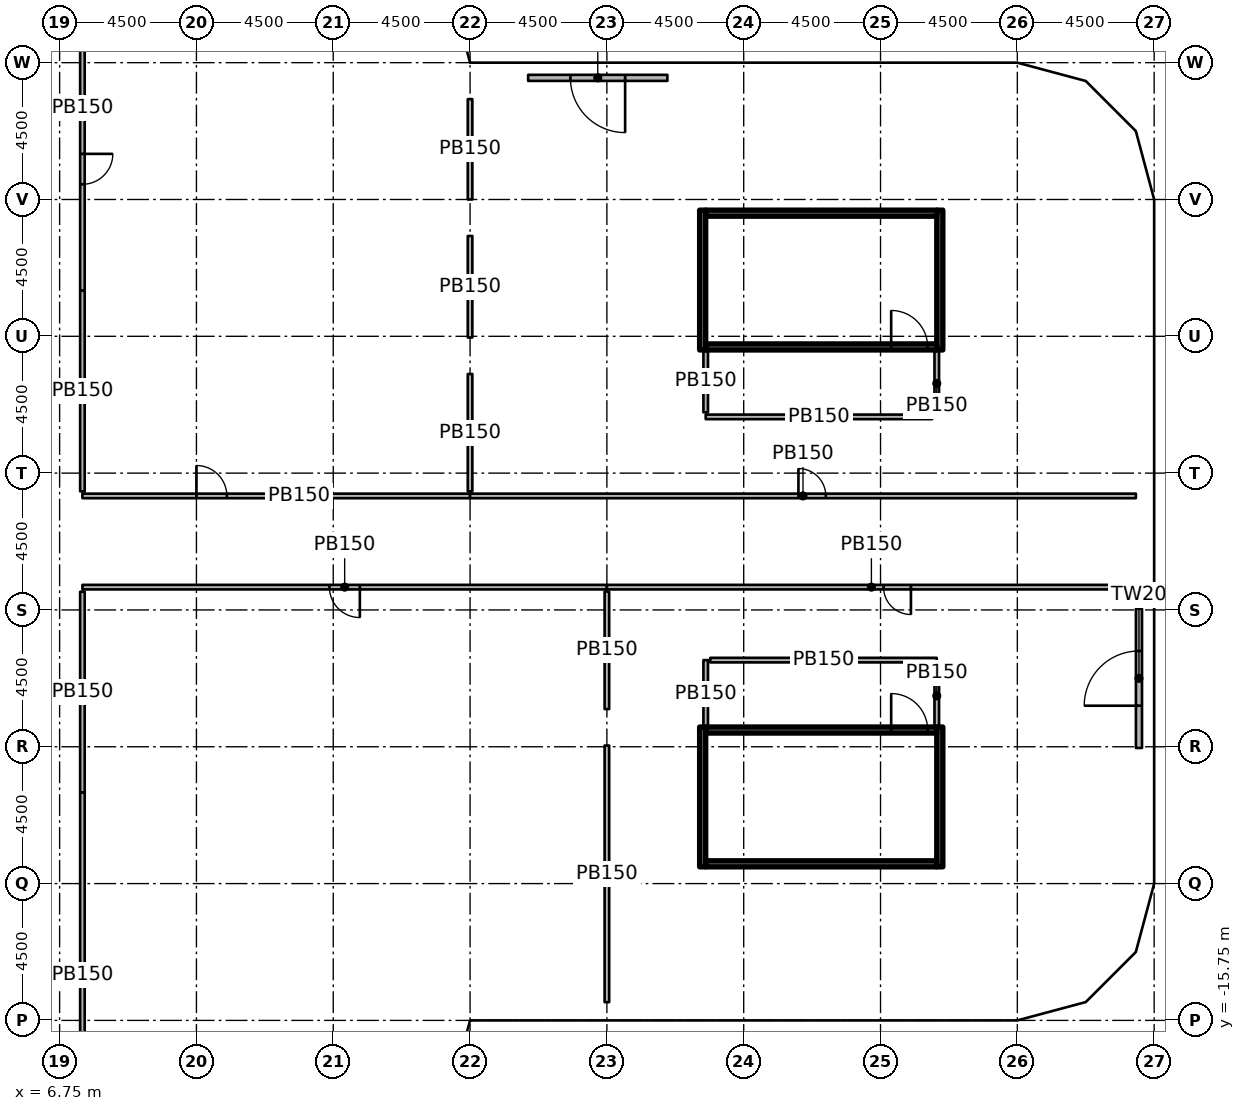
"""IFC4 building model, lengths in metres.
Left out: names, types, materials, properties, quantities, classifications, styles, units other than length and angle.
Written with IfcOpenShell. Run it as: python <this file> out.ifc"""

import sys

from ifc_helpers import new_model, si_unit, direction, frame, frame_2d, origin, origin_2d, place, context, subcontext, project, spatial, rectangle, extrude, element, fill, save


model = new_model("IFC4")
c1 = context("Model", 3, precision=1e-05, world=origin(), true_north=direction((0.0, 1.0)))
c2 = subcontext(c1, "Body", "Model", "MODEL_VIEW")
j1 = project(units=[si_unit("LENGTHUNIT", "METRE"), si_unit("PLANEANGLEUNIT", "RADIAN")], contexts=[c1])
p1 = place(None, origin())
s1 = spatial("IfcSite", under=j1, at=p1, CompositionType="ELEMENT")
p2 = place(p1, origin())
s2 = spatial("IfcBuilding", under=s1, at=p2, CompositionType="ELEMENT")
p3 = place(p2, frame((0.0, 0.0, 17.0)))
s3 = spatial("IfcBuildingStorey", under=s2, at=p3, CompositionType="ELEMENT", Elevation=17.0)
for number, where, z_axis, x_axis in (
    (1, (6.25, -15.75, 0.0), (0.0, 0.0, 1.0), (1.0, 0.0, 0.0)),
    (2, (6.25, -10.75, 0.0), (0.0, 0.0, 1.0), (1.0, 0.0, 0.0)),
    (3, (6.25, -6.25, 0.0), (0.0, 0.0, 1.0), (1.0, 0.0, 0.0)),
    (4, (6.25, 6.25, 0.0), (0.0, 0.0, 1.0), (1.0, 0.0, 0.0)),
    (5, (6.25, 10.75, 0.0), (0.0, 0.0, 1.0), (1.0, 0.0, 0.0)),
    (6, (6.25, 15.75, 0.0), (0.0, 0.0, 1.0), (1.0, 0.0, 0.0)),
    (7, (10.65, -15.15, 0.0), (0.0, 0.0, 1.0), (1.0, 0.0, 0.0)),
    (8, (10.75, -6.25, 0.0), (0.0, 0.0, 1.0), (1.0, 0.0, 0.0)),
    (9, (10.75, 6.25, 0.0), (0.0, 0.0, 1.0), (1.0, 0.0, 0.0)),
    (10, (10.65, 15.15, 0.0), (0.0, 0.0, 1.0), (1.0, 0.0, 0.0)),
    (11, (15.15, -10.65, 0.0), (0.0, 0.0, 1.0), (1.0, 0.0, 0.0)),
    (12, (15.75, -6.25, 0.0), (0.0, 0.0, 1.0), (1.0, 0.0, 0.0)),
    (13, (15.75, 6.25, 0.0), (0.0, 0.0, 1.0), (1.0, 0.0, 0.0)),
    (14, (15.15, 10.65, 0.0), (0.0, 0.0, 1.0), (1.0, 0.0, 0.0)),
    (15, (19.65, -15.15, 0.0), (0.0, 0.0, 1.0), (1.0, 0.0, 0.0)),
    (16, (20.25, -6.11, 0.0), (0.0, 0.0, 1.0), (1.0, 0.0, 0.0)),
    (17, (20.25, 6.11, 0.0), (0.0, 0.0, 1.0), (1.0, 0.0, 0.0)),
    (18, (20.25, 10.65, 0.0), (0.0, 0.0, 1.0), (1.0, 0.0, 0.0)),
    (19, (19.65, 15.15, 0.0), (0.0, 0.0, 1.0), (1.0, 0.0, 0.0)),
    (20, (24.75, -6.11, 0.0), (0.0, 0.0, 1.0), (1.0, 0.0, 0.0)),
    (21, (24.75, 6.11, 0.0), (0.0, 0.0, 1.0), (1.0, 0.0, 0.0)),
    (22, (28.908, -5.475, 0.0), (0.0, 0.0, 1.0), (1.0, 0.0, 0.0)),
    (23, (28.67, -2.25, 0.0), (0.0, 0.0, 1.0), (1.0, 0.0, 0.0)),
    (24, (28.67, 2.25, 0.0), (0.0, 0.0, 1.0), (1.0, 0.0, 0.0)),
    (25, (28.908, 5.475, 0.0), (0.0, 0.0, 1.0), (1.0, 0.0, 0.0)),
    (26, (29.25, 15.15, 0.0), (0.0, 0.0, 1.0), (1.0, 0.0, 0.0)),
    (27, (33.75, -15.15, 0.0), (0.0, 0.0, 1.0), (1.0, 0.0, 0.0)),
    (28, (33.11, -2.25, 0.0), (0.0, 0.0, 1.0), (1.0, 0.0, 0.0)),
    (29, (33.11, 2.25, 0.0), (0.0, 0.0, 1.0), (1.0, 0.0, 0.0)),
    (30, (37.47, 6.75, 0.0), (0.0, 0.0, 1.0), (1.0, 0.0, 0.0)),
    (31, (41.97, -11.25, 0.0), (0.0, 0.0, 1.0), (1.0, 0.0, 0.0)),
    (32, (42.15, 2.25, 0.0), (0.0, 0.0, 1.0), (1.0, 0.0, 0.0)),
):
    element("IfcColumn", number, at=place(p3, frame(where, z_axis=z_axis, x_axis=x_axis)), inside=s3, PredefinedType="COLUMN", context=c2, shape_type="SweptSolid", body=[
        extrude(rectangle(XDim=1.2, YDim=1.2, at=origin_2d()), origin(), (0.0, 0.0, 1.0), 4.55),
    ])
p4 = place(p3, frame((42.25, -6.79, 0.0), z_axis=(0.0, 0.0, 1.0), x_axis=(0.0, 1.0, 0.0)))
e33 = element("IfcWall", 33, at=p4, inside=s3, PredefinedType="SOLIDWALL", context=c2, shape_type="SweptSolid", body=[
    extrude(rectangle(XDim=4.58, YDim=0.2, at=frame_2d((2.29, 0.0))), origin(), (0.0, 0.0, 1.0), 4.55),
])
p5 = place(p4, frame((1.39, 0.0, 0.0)))
e34 = element("IfcOpeningElement", 34, at=p5, cuts=e33, PredefinedType="OPENING", context=c2, shape_type="SweptSolid", body=[
    extrude(rectangle(XDim=1.8, YDim=2.4, at=frame_2d((0.9, 1.2))), frame((0.0, 0.11, 0.0), z_axis=(0.0, -1.0, 0.0), x_axis=(1.0, 0.0, 0.0)), (0.0, 0.0, 1.0), 0.22),
])
p6 = place(p3, frame((26.74, 15.25, 0.0), z_axis=(0.0, 0.0, 1.0), x_axis=(-1.0, 0.0, 0.0)))
e35 = element("IfcWall", 35, at=p6, inside=s3, PredefinedType="SOLIDWALL", context=c2, shape_type="SweptSolid", body=[
    extrude(rectangle(XDim=4.58, YDim=0.2, at=frame_2d((2.29, 0.0))), origin(), (0.0, 0.0, 1.0), 4.55),
])
p7 = place(p6, frame((1.39, 0.0, 0.0)))
e36 = element("IfcOpeningElement", 36, at=p7, cuts=e35, PredefinedType="OPENING", context=c2, shape_type="SweptSolid", body=[
    extrude(rectangle(XDim=1.8, YDim=2.4, at=frame_2d((0.9, 1.2))), frame((0.0, 0.11, 0.0), z_axis=(0.0, -1.0, 0.0), x_axis=(1.0, 0.0, 0.0)), (0.0, 0.0, 1.0), 0.22),
])
for number, where, z_axis, x_axis in (
    (37, (27.9, 6.3, 0.0), (0.0, 0.0, 1.0), (0.0, 1.0, 0.0)),
    (38, (35.7, 6.3, 0.0), (0.0, 0.0, 1.0), (0.0, 1.0, 0.0)),
):
    element("IfcWall", number, at=place(p3, frame(where, z_axis=z_axis, x_axis=x_axis)), inside=s3, PredefinedType="SHEAR", context=c2, shape_type="SweptSolid", body=[
        extrude(rectangle(XDim=4.6, YDim=0.2, at=frame_2d((2.3, 0.0))), origin(), (0.0, 0.0, 1.0), 4.55),
    ])
p8 = place(p3, frame((28.0, 6.4, 0.0), z_axis=(0.0, 0.0, 1.0), x_axis=(1.0, 0.0, 0.0)))
e39 = element("IfcWall", 39, at=p8, inside=s3, PredefinedType="SHEAR", context=c2, shape_type="SweptSolid", body=[
    extrude(rectangle(XDim=7.6, YDim=0.2, at=frame_2d((3.8, 0.0))), origin(), (0.0, 0.0, 1.0), 4.55),
])
p9 = place(p8, frame((6.1, 0.0, 0.0)))
e40 = element("IfcOpeningElement", 40, at=p9, cuts=e39, PredefinedType="OPENING", context=c2, shape_type="SweptSolid", body=[
    extrude(rectangle(XDim=1.2, YDim=2.1, at=frame_2d((0.6, 1.05))), frame((0.0, 0.11, 0.0), z_axis=(0.0, -1.0, 0.0), x_axis=(1.0, 0.0, 0.0)), (0.0, 0.0, 1.0), 0.22),
])
p10 = place(p3, frame((28.0, 10.8, 0.0), z_axis=(0.0, 0.0, 1.0), x_axis=(1.0, 0.0, 0.0)))
e41 = element("IfcWall", 41, at=p10, inside=s3, PredefinedType="SHEAR", context=c2, shape_type="SweptSolid", body=[
    extrude(rectangle(XDim=7.6, YDim=0.2, at=frame_2d((3.8, 0.0))), origin(), (0.0, 0.0, 1.0), 4.55),
])
for number, where, z_axis, x_axis in (
    (42, (27.9, -10.7, 0.0), (0.0, 0.0, 1.0), (0.0, 1.0, 0.0)),
    (43, (35.7, -10.7, 0.0), (0.0, 0.0, 1.0), (0.0, 1.0, 0.0)),
):
    element("IfcWall", number, at=place(p3, frame(where, z_axis=z_axis, x_axis=x_axis)), inside=s3, PredefinedType="SHEAR", context=c2, shape_type="SweptSolid", body=[
        extrude(rectangle(XDim=4.6, YDim=0.2, at=frame_2d((2.3, 0.0))), origin(), (0.0, 0.0, 1.0), 4.55),
    ])
p11 = place(p3, frame((28.0, -10.6, 0.0), z_axis=(0.0, 0.0, 1.0), x_axis=(1.0, 0.0, 0.0)))
e44 = element("IfcWall", 44, at=p11, inside=s3, PredefinedType="SHEAR", context=c2, shape_type="SweptSolid", body=[
    extrude(rectangle(XDim=7.6, YDim=0.2, at=frame_2d((3.8, 0.0))), origin(), (0.0, 0.0, 1.0), 4.55),
])
p12 = place(p3, frame((28.0, -6.2, 0.0), z_axis=(0.0, 0.0, 1.0), x_axis=(1.0, 0.0, 0.0)))
e45 = element("IfcWall", 45, at=p12, inside=s3, PredefinedType="SHEAR", context=c2, shape_type="SweptSolid", body=[
    extrude(rectangle(XDim=7.6, YDim=0.2, at=frame_2d((3.8, 0.0))), origin(), (0.0, 0.0, 1.0), 4.55),
])
p13 = place(p12, frame((6.1, 0.0, 0.0)))
e46 = element("IfcOpeningElement", 46, at=p13, cuts=e45, PredefinedType="OPENING", context=c2, shape_type="SweptSolid", body=[
    extrude(rectangle(XDim=1.2, YDim=2.1, at=frame_2d((0.6, 1.05))), frame((0.0, 0.11, 0.0), z_axis=(0.0, -1.0, 0.0), x_axis=(1.0, 0.0, 0.0)), (0.0, 0.0, 1.0), 0.22),
])
p14 = place(p3, frame((35.6, 6.3, 0.0), z_axis=(0.0, 0.0, 1.0), x_axis=(0.0, -1.0, 0.0)))
e47 = element("IfcWall", 47, at=p14, inside=s3, PredefinedType="PARTITIONING", context=c2, shape_type="SweptSolid", body=[
    extrude(rectangle(XDim=2.2, YDim=0.15, at=frame_2d((1.1, 0.0))), origin(), (0.0, 0.0, 1.0), 4.55),
])
p15 = place(p3, frame((35.45, 4.1, 0.0), z_axis=(0.0, 0.0, 1.0), x_axis=(-1.0, 0.0, 0.0)))
e48 = element("IfcWall", 48, at=p15, inside=s3, PredefinedType="PARTITIONING", context=c2, shape_type="SweptSolid", body=[
    extrude(rectangle(XDim=7.45, YDim=0.15, at=frame_2d((3.725, 0.0))), origin(), (0.0, 0.0, 1.0), 4.55),
])
p16 = place(p3, frame((28.0, 4.25, 0.0), z_axis=(0.0, 0.0, 1.0), x_axis=(0.0, 1.0, 0.0)))
e49 = element("IfcWall", 49, at=p16, inside=s3, PredefinedType="PARTITIONING", context=c2, shape_type="SweptSolid", body=[
    extrude(rectangle(XDim=2.05, YDim=0.15, at=frame_2d((1.025, 0.0))), origin(), (0.0, 0.0, 1.0), 4.55),
])
p17 = place(p3, frame((28.0, -6.1, 0.0), z_axis=(0.0, 0.0, 1.0), x_axis=(0.0, 1.0, 0.0)))
e50 = element("IfcWall", 50, at=p17, inside=s3, PredefinedType="PARTITIONING", context=c2, shape_type="SweptSolid", body=[
    extrude(rectangle(XDim=2.2, YDim=0.15, at=frame_2d((1.1, 0.0))), origin(), (0.0, 0.0, 1.0), 4.55),
])
p18 = place(p3, frame((28.15, -3.9, 0.0), z_axis=(0.0, 0.0, 1.0), x_axis=(1.0, 0.0, 0.0)))
e51 = element("IfcWall", 51, at=p18, inside=s3, PredefinedType="PARTITIONING", context=c2, shape_type="SweptSolid", body=[
    extrude(rectangle(XDim=7.45, YDim=0.15, at=frame_2d((3.725, 0.0))), origin(), (0.0, 0.0, 1.0), 4.55),
])
p19 = place(p3, frame((35.6, -4.05, 0.0), z_axis=(0.0, 0.0, 1.0), x_axis=(0.0, -1.0, 0.0)))
e52 = element("IfcWall", 52, at=p19, inside=s3, PredefinedType="PARTITIONING", context=c2, shape_type="SweptSolid", body=[
    extrude(rectangle(XDim=2.05, YDim=0.15, at=frame_2d((1.025, 0.0))), origin(), (0.0, 0.0, 1.0), 4.55),
])
p20 = place(p3, frame((7.5, 20.25, 0.0), z_axis=(0.0, 0.0, 1.0), x_axis=(0.0, -1.0, 0.0)))
e53 = element("IfcWall", 53, at=p20, inside=s3, PredefinedType="PARTITIONING", context=c2, shape_type="SweptSolid", body=[
    extrude(rectangle(XDim=12.0, YDim=0.15, at=frame_2d((6.0, 0.0))), origin(), (0.0, 0.0, 1.0), 4.55),
])
p21 = place(p20, frame((7.5, 0.0, 0.0)))
e54 = element("IfcOpeningElement", 54, at=p21, cuts=e53, PredefinedType="OPENING", context=c2, shape_type="SweptSolid", body=[
    extrude(rectangle(XDim=1.0, YDim=2.1, at=frame_2d((0.5, 1.05))), frame((0.0, 0.085, 0.0), z_axis=(0.0, -1.0, 0.0), x_axis=(1.0, 0.0, 0.0)), (0.0, 0.0, 1.0), 0.17),
])
p22 = place(p3, frame((7.5, -8.25, 0.0), z_axis=(0.0, 0.0, 1.0), x_axis=(0.0, -1.0, 0.0)))
e55 = element("IfcWall", 55, at=p22, inside=s3, PredefinedType="PARTITIONING", context=c2, shape_type="SweptSolid", body=[
    extrude(rectangle(XDim=12.0, YDim=0.15, at=frame_2d((6.0, 0.0))), origin(), (0.0, 0.0, 1.0), 4.55),
])
p23 = place(p3, frame((7.5, 1.5, 0.0), z_axis=(0.0, 0.0, 1.0), x_axis=(1.0, 0.0, 0.0)))
e56 = element("IfcWall", 56, at=p23, inside=s3, PredefinedType="PARTITIONING", context=c2, shape_type="SweptSolid", body=[
    extrude(rectangle(XDim=12.75, YDim=0.15, at=frame_2d((6.375, 0.0))), origin(), (0.0, 0.0, 1.0), 4.55),
])
p24 = place(p23, frame((3.75, 0.0, 0.0)))
e57 = element("IfcOpeningElement", 57, at=p24, cuts=e56, PredefinedType="OPENING", context=c2, shape_type="SweptSolid", body=[
    extrude(rectangle(XDim=1.0, YDim=2.1, at=frame_2d((0.5, 1.05))), frame((0.0, 0.085, 0.0), z_axis=(0.0, -1.0, 0.0), x_axis=(1.0, 0.0, 0.0)), (0.0, 0.0, 1.0), 0.17),
])
p25 = place(p3, frame((20.25, 1.5, 0.0), z_axis=(0.0, 0.0, 1.0), x_axis=(1.0, 0.0, 0.0)))
e58 = element("IfcWall", 58, at=p25, inside=s3, PredefinedType="PARTITIONING", context=c2, shape_type="SweptSolid", body=[
    extrude(rectangle(XDim=21.9, YDim=0.15, at=frame_2d((10.95, 0.0))), origin(), (0.0, 0.0, 1.0), 4.55),
])
p26 = place(p25, frame((10.8, 0.0, 0.0)))
e59 = element("IfcOpeningElement", 59, at=p26, cuts=e58, PredefinedType="OPENING", context=c2, shape_type="SweptSolid", body=[
    extrude(rectangle(XDim=0.9, YDim=2.1, at=frame_2d((0.45, 1.05))), frame((0.0, 0.085, 0.0), z_axis=(0.0, -1.0, 0.0), x_axis=(1.0, 0.0, 0.0)), (0.0, 0.0, 1.0), 0.17),
])
p27 = place(p3, frame((24.75, -1.5, 0.0), z_axis=(0.0, 0.0, 1.0), x_axis=(-1.0, 0.0, 0.0)))
e60 = element("IfcWall", 60, at=p27, inside=s3, PredefinedType="PARTITIONING", context=c2, shape_type="SweptSolid", body=[
    extrude(rectangle(XDim=17.25, YDim=0.15, at=frame_2d((8.625, 0.0))), origin(), (0.0, 0.0, 1.0), 4.55),
])
p28 = place(p27, frame((8.125, 0.0, 0.0)))
e61 = element("IfcOpeningElement", 61, at=p28, cuts=e60, PredefinedType="OPENING", context=c2, shape_type="SweptSolid", body=[
    extrude(rectangle(XDim=1.0, YDim=2.1, at=frame_2d((0.5, 1.05))), frame((0.0, 0.085, 0.0), z_axis=(0.0, -1.0, 0.0), x_axis=(1.0, 0.0, 0.0)), (0.0, 0.0, 1.0), 0.17),
])
p29 = place(p3, frame((42.15, -1.5, 0.0), z_axis=(0.0, 0.0, 1.0), x_axis=(-1.0, 0.0, 0.0)))
e62 = element("IfcWall", 62, at=p29, inside=s3, PredefinedType="PARTITIONING", context=c2, shape_type="SweptSolid", body=[
    extrude(rectangle(XDim=17.4, YDim=0.15, at=frame_2d((8.7, 0.0))), origin(), (0.0, 0.0, 1.0), 4.55),
])
p30 = place(p29, frame((7.4, 0.0, 0.0)))
e63 = element("IfcOpeningElement", 63, at=p30, cuts=e62, PredefinedType="OPENING", context=c2, shape_type="SweptSolid", body=[
    extrude(rectangle(XDim=0.9, YDim=2.1, at=frame_2d((0.45, 1.05))), frame((0.0, 0.085, 0.0), z_axis=(0.0, -1.0, 0.0), x_axis=(1.0, 0.0, 0.0)), (0.0, 0.0, 1.0), 0.17),
])
p31 = place(p3, frame((20.25, 14.55, 0.0), z_axis=(0.0, 0.0, 1.0), x_axis=(0.0, -1.0, 0.0)))
e64 = element("IfcWall", 64, at=p31, inside=s3, PredefinedType="PARTITIONING", context=c2, shape_type="SweptSolid", body=[
    extrude(rectangle(XDim=3.3, YDim=0.15, at=frame_2d((1.65, 0.0))), origin(), (0.0, 0.0, 1.0), 4.55),
])
p32 = place(p3, frame((20.25, 10.05, 0.0), z_axis=(0.0, 0.0, 1.0), x_axis=(0.0, -1.0, 0.0)))
e65 = element("IfcWall", 65, at=p32, inside=s3, PredefinedType="PARTITIONING", context=c2, shape_type="SweptSolid", body=[
    extrude(rectangle(XDim=3.34, YDim=0.15, at=frame_2d((1.67, 0.0))), origin(), (0.0, 0.0, 1.0), 4.55),
])
p33 = place(p3, frame((20.25, 5.51, 0.0), z_axis=(0.0, 0.0, 1.0), x_axis=(0.0, -1.0, 0.0)))
e66 = element("IfcWall", 66, at=p33, inside=s3, PredefinedType="PARTITIONING", context=c2, shape_type="SweptSolid", body=[
    extrude(rectangle(XDim=3.86, YDim=0.15, at=frame_2d((1.93, 0.0))), origin(), (0.0, 0.0, 1.0), 4.55),
])
p34 = place(p3, frame((7.5, 1.65, 0.0), z_axis=(0.0, 0.0, 1.0), x_axis=(0.0, 1.0, 0.0)))
e67 = element("IfcWall", 67, at=p34, inside=s3, PredefinedType="PARTITIONING", context=c2, shape_type="SweptSolid", body=[
    extrude(rectangle(XDim=6.6, YDim=0.15, at=frame_2d((3.3, 0.0))), origin(), (0.0, 0.0, 1.0), 4.55),
])
p35 = place(p3, frame((24.75, -1.65, 0.0), z_axis=(0.0, 0.0, 1.0), x_axis=(0.0, -1.0, 0.0)))
e68 = element("IfcWall", 68, at=p35, inside=s3, PredefinedType="PARTITIONING", context=c2, shape_type="SweptSolid", body=[
    extrude(rectangle(XDim=3.86, YDim=0.15, at=frame_2d((1.93, 0.0))), origin(), (0.0, 0.0, 1.0), 4.55),
])
p36 = place(p3, frame((24.75, -6.71, 0.0), z_axis=(0.0, 0.0, 1.0), x_axis=(0.0, -1.0, 0.0)))
e69 = element("IfcWall", 69, at=p36, inside=s3, PredefinedType="PARTITIONING", context=c2, shape_type="SweptSolid", body=[
    extrude(rectangle(XDim=8.44, YDim=0.15, at=frame_2d((4.22, 0.0))), origin(), (0.0, 0.0, 1.0), 4.55),
])
p37 = place(p3, frame((7.5, -8.25, 0.0), z_axis=(0.0, 0.0, 1.0), x_axis=(0.0, 1.0, 0.0)))
e70 = element("IfcWall", 70, at=p37, inside=s3, PredefinedType="PARTITIONING", context=c2, shape_type="SweptSolid", body=[
    extrude(rectangle(XDim=6.6, YDim=0.15, at=frame_2d((3.3, 0.0))), origin(), (0.0, 0.0, 1.0), 4.55),
])
p38 = place(p5, origin())
e71 = element("IfcDoor", 71, at=p38, inside=s3, OperationType="SINGLE_SWING_LEFT", PredefinedType="DOOR", context=c2, shape_type="SweptSolid", body=[
    extrude(rectangle(XDim=1.8, YDim=2.4, at=frame_2d((0.9, 1.2))), frame((0.0, 0.025, 0.0), z_axis=(0.0, -1.0, 0.0), x_axis=(1.0, 0.0, 0.0)), (0.0, 0.0, 1.0), 0.05),
])
fill(e34, e71)
p39 = place(p7, origin())
e72 = element("IfcDoor", 72, at=p39, inside=s3, OperationType="SINGLE_SWING_LEFT", PredefinedType="DOOR", context=c2, shape_type="SweptSolid", body=[
    extrude(rectangle(XDim=1.8, YDim=2.4, at=frame_2d((0.9, 1.2))), frame((0.0, 0.025, 0.0), z_axis=(0.0, -1.0, 0.0), x_axis=(1.0, 0.0, 0.0)), (0.0, 0.0, 1.0), 0.05),
])
fill(e36, e72)
p40 = place(p9, origin())
e73 = element("IfcDoor", 73, at=p40, inside=s3, OperationType="SINGLE_SWING_RIGHT", PredefinedType="DOOR", context=c2, shape_type="SweptSolid", body=[
    extrude(rectangle(XDim=1.2, YDim=2.1, at=frame_2d((0.6, 1.05))), frame((0.0, 0.025, 0.0), z_axis=(0.0, -1.0, 0.0), x_axis=(1.0, 0.0, 0.0)), (0.0, 0.0, 1.0), 0.05),
])
fill(e40, e73)
p41 = place(p13, origin())
e74 = element("IfcDoor", 74, at=p41, inside=s3, OperationType="SINGLE_SWING_RIGHT", PredefinedType="DOOR", context=c2, shape_type="SweptSolid", body=[
    extrude(rectangle(XDim=1.2, YDim=2.1, at=frame_2d((0.6, 1.05))), frame((0.0, 0.025, 0.0), z_axis=(0.0, -1.0, 0.0), x_axis=(1.0, 0.0, 0.0)), (0.0, 0.0, 1.0), 0.05),
])
fill(e46, e74)
p42 = place(p21, origin())
e75 = element("IfcDoor", 75, at=p42, inside=s3, OperationType="SINGLE_SWING_LEFT", PredefinedType="DOOR", context=c2, shape_type="SweptSolid", body=[
    extrude(rectangle(XDim=1.0, YDim=2.1, at=frame_2d((0.5, 1.05))), frame((0.0, 0.025, 0.0), z_axis=(0.0, -1.0, 0.0), x_axis=(1.0, 0.0, 0.0)), (0.0, 0.0, 1.0), 0.05),
])
fill(e54, e75)
p43 = place(p24, origin())
e76 = element("IfcDoor", 76, at=p43, inside=s3, OperationType="SINGLE_SWING_LEFT", PredefinedType="DOOR", context=c2, shape_type="SweptSolid", body=[
    extrude(rectangle(XDim=1.0, YDim=2.1, at=frame_2d((0.5, 1.05))), frame((0.0, 0.025, 0.0), z_axis=(0.0, -1.0, 0.0), x_axis=(1.0, 0.0, 0.0)), (0.0, 0.0, 1.0), 0.05),
])
fill(e57, e76)
p44 = place(p26, origin())
e77 = element("IfcDoor", 77, at=p44, inside=s3, OperationType="SINGLE_SWING_LEFT", PredefinedType="DOOR", context=c2, shape_type="SweptSolid", body=[
    extrude(rectangle(XDim=0.9, YDim=2.1, at=frame_2d((0.45, 1.05))), frame((0.0, 0.025, 0.0), z_axis=(0.0, -1.0, 0.0), x_axis=(1.0, 0.0, 0.0)), (0.0, 0.0, 1.0), 0.05),
])
fill(e59, e77)
p45 = place(p28, origin())
e78 = element("IfcDoor", 78, at=p45, inside=s3, OperationType="SINGLE_SWING_LEFT", PredefinedType="DOOR", context=c2, shape_type="SweptSolid", body=[
    extrude(rectangle(XDim=1.0, YDim=2.1, at=frame_2d((0.5, 1.05))), frame((0.0, 0.025, 0.0), z_axis=(0.0, -1.0, 0.0), x_axis=(1.0, 0.0, 0.0)), (0.0, 0.0, 1.0), 0.05),
])
fill(e61, e78)
p46 = place(p30, origin())
e79 = element("IfcDoor", 79, at=p46, inside=s3, OperationType="SINGLE_SWING_LEFT", PredefinedType="DOOR", context=c2, shape_type="SweptSolid", body=[
    extrude(rectangle(XDim=0.9, YDim=2.1, at=frame_2d((0.45, 1.05))), frame((0.0, 0.025, 0.0), z_axis=(0.0, -1.0, 0.0), x_axis=(1.0, 0.0, 0.0)), (0.0, 0.0, 1.0), 0.05),
])
fill(e63, e79)
save(model, sys.argv[1])
